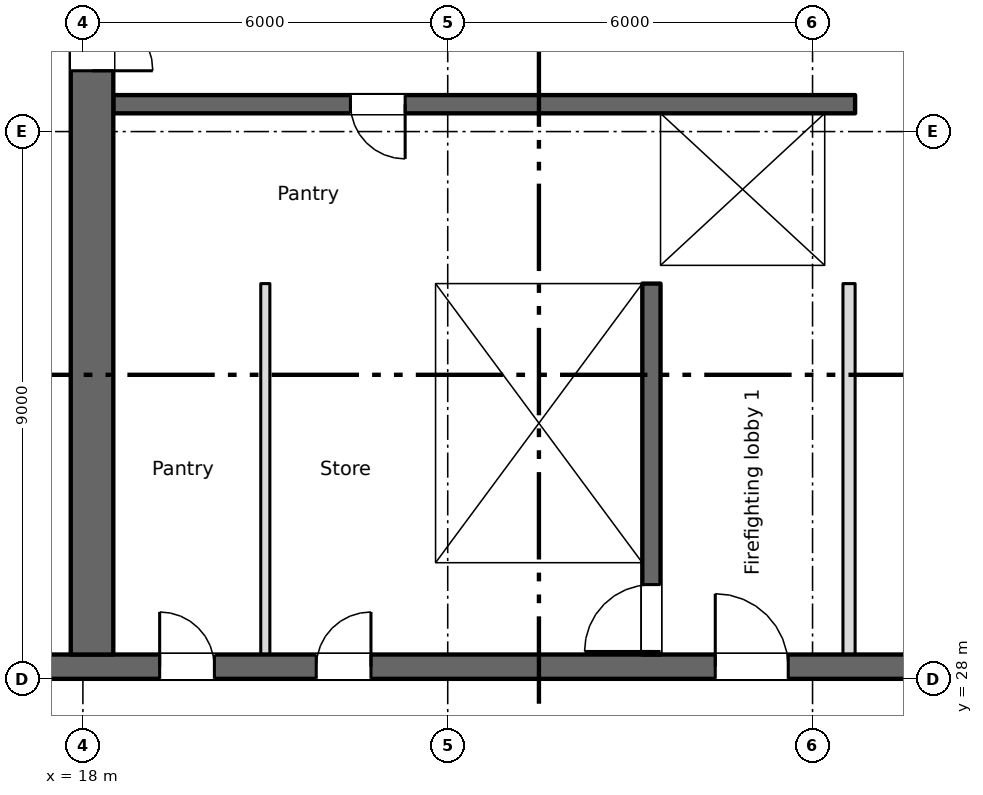
"""IFC4 building model, lengths in metres.
Left out: names, types, materials, properties, quantities, classifications, styles, units other than length and angle.
Written with IfcOpenShell. Run it as: python <this file> out.ifc"""

import sys

from ifc_helpers import new_model, si_unit, direction, frame, frame_2d, origin, place, context, subcontext, project, spatial, rectangle, extrude, element, fill, save


model = new_model("IFC4")
c1 = context("Model", 3, precision=1e-05, world=origin(), true_north=direction((0.0, 1.0)))
c2 = subcontext(c1, "Body", "Model", "MODEL_VIEW")
j1 = project(units=[si_unit("LENGTHUNIT", "METRE"), si_unit("PLANEANGLEUNIT", "RADIAN")], contexts=[c1])
p1 = place(None, origin())
s1 = spatial("IfcSite", under=j1, at=p1, CompositionType="ELEMENT")
p2 = place(p1, origin())
s2 = spatial("IfcBuilding", under=s1, at=p2, CompositionType="ELEMENT")
p3 = place(p2, frame((0.0, 0.0, 208.0)))
s3 = spatial("IfcBuildingStorey", under=s2, at=p3, CompositionType="ELEMENT", Elevation=208.0)
p4 = place(p3, frame((6.6, 28.2, 0.0), z_axis=(0.0, 0.0, 1.0), x_axis=(1.0, 0.0, 0.0)))
e1 = element("IfcWall", 1, at=p4, inside=s3, PredefinedType="SHEAR", context=c2, shape_type="SweptSolid", body=[
    extrude(rectangle(XDim=57.9, YDim=0.4, at=frame_2d((28.95, 0.0))), origin(), (0.0, 0.0, 1.0), 3.35),
])
p5 = place(p4, frame((12.663, 0.0, 0.0)))
e2 = element("IfcOpeningElement", 2, at=p5, cuts=e1, PredefinedType="OPENING", context=c2, shape_type="SweptSolid", body=[
    extrude(rectangle(XDim=0.9, YDim=2.1, at=frame_2d((0.45, 1.05))), frame((0.0, 0.21, 0.0), z_axis=(0.0, -1.0, 0.0), x_axis=(1.0, 0.0, 0.0)), (0.0, 0.0, 1.0), 0.42),
])
p6 = place(p4, frame((15.238, 0.0, 0.0)))
e3 = element("IfcOpeningElement", 3, at=p6, cuts=e1, PredefinedType="OPENING", context=c2, shape_type="SweptSolid", body=[
    extrude(rectangle(XDim=0.9, YDim=2.1, at=frame_2d((0.45, 1.05))), frame((0.0, 0.21, 0.0), z_axis=(0.0, -1.0, 0.0), x_axis=(1.0, 0.0, 0.0)), (0.0, 0.0, 1.0), 0.42),
])
p7 = place(p4, frame((49.95, 0.0, 0.0)))
e4 = element("IfcOpeningElement", 4, at=p7, cuts=e1, PredefinedType="OPENING", context=c2, shape_type="SweptSolid", body=[
    extrude(rectangle(XDim=0.9, YDim=2.1, at=frame_2d((0.45, 1.05))), frame((0.0, 0.21, 0.0), z_axis=(0.0, -1.0, 0.0), x_axis=(1.0, 0.0, 0.0)), (0.0, 0.0, 1.0), 0.42),
])
p8 = place(p4, frame((0.663, 0.0, 0.0)))
e5 = element("IfcOpeningElement", 5, at=p8, cuts=e1, PredefinedType="OPENING", context=c2, shape_type="SweptSolid", body=[
    extrude(rectangle(XDim=0.9, YDim=2.1, at=frame_2d((0.45, 1.05))), frame((0.0, 0.21, 0.0), z_axis=(0.0, -1.0, 0.0), x_axis=(1.0, 0.0, 0.0)), (0.0, 0.0, 1.0), 0.42),
])
p9 = place(p4, frame((2.238, 0.0, 0.0)))
e6 = element("IfcOpeningElement", 6, at=p9, cuts=e1, PredefinedType="OPENING", context=c2, shape_type="SweptSolid", body=[
    extrude(rectangle(XDim=0.9, YDim=2.1, at=frame_2d((0.45, 1.05))), frame((0.0, 0.21, 0.0), z_axis=(0.0, -1.0, 0.0), x_axis=(1.0, 0.0, 0.0)), (0.0, 0.0, 1.0), 0.42),
])
p10 = place(p4, frame((4.8, 0.0, 0.0)))
e7 = element("IfcOpeningElement", 7, at=p10, cuts=e1, PredefinedType="OPENING", context=c2, shape_type="SweptSolid", body=[
    extrude(rectangle(XDim=1.2, YDim=2.1, at=frame_2d((0.6, 1.05))), frame((0.0, 0.21, 0.0), z_axis=(0.0, -1.0, 0.0), x_axis=(1.0, 0.0, 0.0)), (0.0, 0.0, 1.0), 0.42),
])
p11 = place(p4, frame((31.8, 0.0, 0.0)))
e8 = element("IfcOpeningElement", 8, at=p11, cuts=e1, PredefinedType="OPENING", context=c2, shape_type="SweptSolid", body=[
    extrude(rectangle(XDim=1.2, YDim=2.1, at=frame_2d((0.6, 1.05))), frame((0.0, 0.21, 0.0), z_axis=(0.0, -1.0, 0.0), x_axis=(1.0, 0.0, 0.0)), (0.0, 0.0, 1.0), 0.42),
])
p12 = place(p4, frame((55.3, 0.0, 0.0)))
e9 = element("IfcOpeningElement", 9, at=p12, cuts=e1, PredefinedType="OPENING", context=c2, shape_type="SweptSolid", body=[
    extrude(rectangle(XDim=1.2, YDim=2.1, at=frame_2d((0.6, 1.05))), frame((0.0, 0.21, 0.0), z_axis=(0.0, -1.0, 0.0), x_axis=(1.0, 0.0, 0.0)), (0.0, 0.0, 1.0), 0.42),
])
p13 = place(p4, frame((21.8, 0.0, 0.0)))
e10 = element("IfcOpeningElement", 10, at=p13, cuts=e1, PredefinedType="OPENING", context=c2, shape_type="SweptSolid", body=[
    extrude(rectangle(XDim=1.2, YDim=2.1, at=frame_2d((0.6, 1.05))), frame((0.0, 0.21, 0.0), z_axis=(0.0, -1.0, 0.0), x_axis=(1.0, 0.0, 0.0)), (0.0, 0.0, 1.0), 0.42),
])
p14 = place(p4, frame((41.8, 0.0, 0.0)))
e11 = element("IfcOpeningElement", 11, at=p14, cuts=e1, PredefinedType="OPENING", context=c2, shape_type="SweptSolid", body=[
    extrude(rectangle(XDim=1.2, YDim=2.1, at=frame_2d((0.6, 1.05))), frame((0.0, 0.21, 0.0), z_axis=(0.0, -1.0, 0.0), x_axis=(1.0, 0.0, 0.0)), (0.0, 0.0, 1.0), 0.42),
])
p15 = place(p4, frame((24.95, 0.0, 0.0)))
e12 = element("IfcOpeningElement", 12, at=p15, cuts=e1, PredefinedType="OPENING", context=c2, shape_type="SweptSolid", body=[
    extrude(rectangle(XDim=2.4, YDim=2.1, at=frame_2d((1.2, 1.05))), frame((0.0, 0.21, 0.0), z_axis=(0.0, -1.0, 0.0), x_axis=(1.0, 0.0, 0.0)), (0.0, 0.0, 1.0), 0.42),
])
p16 = place(p4, frame((37.45, 0.0, 0.0)))
e13 = element("IfcOpeningElement", 13, at=p16, cuts=e1, PredefinedType="OPENING", context=c2, shape_type="SweptSolid", body=[
    extrude(rectangle(XDim=2.4, YDim=2.1, at=frame_2d((1.2, 1.05))), frame((0.0, 0.21, 0.0), z_axis=(0.0, -1.0, 0.0), x_axis=(1.0, 0.0, 0.0)), (0.0, 0.0, 1.0), 0.42),
])
p17 = place(p4, frame((8.1, 0.0, 0.0)))
e14 = element("IfcOpeningElement", 14, at=p17, cuts=e1, PredefinedType="OPENING", context=c2, shape_type="SweptSolid", body=[
    extrude(rectangle(XDim=2.4, YDim=2.1, at=frame_2d((1.2, 1.05))), frame((0.0, 0.21, 0.0), z_axis=(0.0, -1.0, 0.0), x_axis=(1.0, 0.0, 0.0)), (0.0, 0.0, 1.0), 0.42),
])
p18 = place(p4, frame((28.95, 0.0, 0.0)))
e15 = element("IfcOpeningElement", 15, at=p18, cuts=e1, PredefinedType="OPENING", context=c2, shape_type="SweptSolid", body=[
    extrude(rectangle(XDim=0.9, YDim=2.1, at=frame_2d((0.45, 1.05))), frame((0.0, 0.21, 0.0), z_axis=(0.0, -1.0, 0.0), x_axis=(1.0, 0.0, 0.0)), (0.0, 0.0, 1.0), 0.42),
])
p19 = place(p4, frame((34.95, 0.0, 0.0)))
e16 = element("IfcOpeningElement", 16, at=p19, cuts=e1, PredefinedType="OPENING", context=c2, shape_type="SweptSolid", body=[
    extrude(rectangle(XDim=0.9, YDim=2.1, at=frame_2d((0.45, 1.05))), frame((0.0, 0.21, 0.0), z_axis=(0.0, -1.0, 0.0), x_axis=(1.0, 0.0, 0.0)), (0.0, 0.0, 1.0), 0.42),
])
p20 = place(p3, frame((18.15, 28.4, 0.0), z_axis=(0.0, 0.0, 1.0), x_axis=(0.0, 1.0, 0.0)))
e17 = element("IfcWall", 17, at=p20, inside=s3, PredefinedType="SHEAR", context=c2, shape_type="SweptSolid", body=[
    extrude(rectangle(XDim=16.9, YDim=0.7, at=frame_2d((8.45, 0.0))), origin(), (0.0, 0.0, 1.0), 3.35),
])
p21 = place(p20, frame((9.6, 0.0, 0.0)))
e18 = element("IfcOpeningElement", 18, at=p21, cuts=e17, PredefinedType="OPENING", context=c2, shape_type="SweptSolid", body=[
    extrude(rectangle(XDim=2.0, YDim=2.1, at=frame_2d((1.0, 1.05))), frame((0.0, 0.36, 0.0), z_axis=(0.0, -1.0, 0.0), x_axis=(1.0, 0.0, 0.0)), (0.0, 0.0, 1.0), 0.72),
])
p22 = place(p20, frame((15.4, 0.0, 0.0)))
e19 = element("IfcOpeningElement", 19, at=p22, cuts=e17, PredefinedType="OPENING", context=c2, shape_type="SweptSolid", body=[
    extrude(rectangle(XDim=1.2, YDim=2.1, at=frame_2d((0.6, 1.05))), frame((0.0, 0.36, 0.0), z_axis=(0.0, -1.0, 0.0), x_axis=(1.0, 0.0, 0.0)), (0.0, 0.0, 1.0), 0.72),
])
p23 = place(p3, frame((23.65, 28.4, 0.0), z_axis=(0.0, 0.0, 1.0), x_axis=(0.0, 1.0, 0.0)))
e20 = element("IfcWall", 20, at=p23, inside=s3, PredefinedType="SHEAR", context=c2, shape_type="SweptSolid", body=[
    extrude(rectangle(XDim=6.1, YDim=0.3, at=frame_2d((3.05, 0.0))), origin(), (0.0, 0.0, 1.0), 3.35),
])
p24 = place(p3, frame((27.35, 28.4, 0.0), z_axis=(0.0, 0.0, 1.0), x_axis=(0.0, 1.0, 0.0)))
e21 = element("IfcWall", 21, at=p24, inside=s3, PredefinedType="SHEAR", context=c2, shape_type="SweptSolid", body=[
    extrude(rectangle(XDim=6.1, YDim=0.3, at=frame_2d((3.05, 0.0))), origin(), (0.0, 0.0, 1.0), 3.35),
])
p25 = place(p24, frame((0.05, 0.0, 0.0)))
e22 = element("IfcOpeningElement", 22, at=p25, cuts=e21, PredefinedType="OPENING", context=c2, shape_type="SweptSolid", body=[
    extrude(rectangle(XDim=1.1, YDim=2.1, at=frame_2d((0.55, 1.05))), frame((0.0, 0.16, 0.0), z_axis=(0.0, -1.0, 0.0), x_axis=(1.0, 0.0, 0.0)), (0.0, 0.0, 1.0), 0.32),
])
p26 = place(p3, frame((18.5, 34.65, 0.0), z_axis=(0.0, 0.0, 1.0), x_axis=(1.0, 0.0, 0.0)))
e23 = element("IfcWall", 23, at=p26, inside=s3, PredefinedType="SHEAR", context=c2, shape_type="SweptSolid", body=[
    extrude(rectangle(XDim=12.2, YDim=0.3, at=frame_2d((6.1, 0.0))), origin(), (0.0, 0.0, 1.0), 3.35),
])
p27 = place(p26, frame((9.8, 0.0, 0.0)))
e24 = element("IfcOpeningElement", 24, at=p27, cuts=e23, PredefinedType="OPENING", context=c2, shape_type="SweptSolid", body=[
    extrude(rectangle(XDim=1.1, YDim=2.1, at=frame_2d((0.55, 1.05))), frame((0.0, 0.16, 0.0), z_axis=(0.0, -1.0, 0.0), x_axis=(1.0, 0.0, 0.0)), (0.0, 0.0, 1.0), 0.32),
])
p28 = place(p3, frame((30.7, 37.45, 0.0), z_axis=(0.0, 0.0, 1.0), x_axis=(-1.0, 0.0, 0.0)))
e25 = element("IfcWall", 25, at=p28, inside=s3, PredefinedType="SHEAR", context=c2, shape_type="SweptSolid", body=[
    extrude(rectangle(XDim=12.2, YDim=0.3, at=frame_2d((6.1, 0.0))), origin(), (0.0, 0.0, 1.0), 3.35),
])
p29 = place(p28, frame((7.4, 0.0, 0.0)))
e26 = element("IfcOpeningElement", 26, at=p29, cuts=e25, PredefinedType="OPENING", context=c2, shape_type="SweptSolid", body=[
    extrude(rectangle(XDim=0.9, YDim=2.1, at=frame_2d((0.45, 1.05))), frame((0.0, 0.16, 0.0), z_axis=(0.0, -1.0, 0.0), x_axis=(1.0, 0.0, 0.0)), (0.0, 0.0, 1.0), 0.32),
])
p30 = place(p3, frame((27.35, 34.8, 0.0), z_axis=(0.0, 0.0, 1.0), x_axis=(0.0, 1.0, 0.0)))
e27 = element("IfcWall", 27, at=p30, inside=s3, PredefinedType="SHEAR", context=c2, shape_type="SweptSolid", body=[
    extrude(rectangle(XDim=2.5, YDim=0.3, at=frame_2d((1.25, 0.0))), origin(), (0.0, 0.0, 1.0), 3.35),
])
p31 = place(p3, frame((30.45, 34.8, 0.0), z_axis=(0.0, 0.0, 1.0), x_axis=(0.0, 1.0, 0.0)))
e28 = element("IfcWall", 28, at=p31, inside=s3, PredefinedType="SHEAR", context=c2, shape_type="SweptSolid", body=[
    extrude(rectangle(XDim=2.5, YDim=0.5, at=frame_2d((1.25, 0.0))), origin(), (0.0, 0.0, 1.0), 3.35),
])
p32 = place(p3, frame((30.6, 28.4, 0.0), z_axis=(0.0, 0.0, 1.0), x_axis=(0.0, 1.0, 0.0)))
e29 = element("IfcWall", 29, at=p32, inside=s3, PredefinedType="PARTITIONING", context=c2, shape_type="SweptSolid", body=[
    extrude(rectangle(XDim=6.1, YDim=0.2, at=frame_2d((3.05, 0.0))), origin(), (0.0, 0.0, 1.0), 3.35),
])
p33 = place(p3, frame((21.0, 28.4, 0.0), z_axis=(0.0, 0.0, 1.0), x_axis=(0.0, 1.0, 0.0)))
e30 = element("IfcWall", 30, at=p33, inside=s3, PredefinedType="PARTITIONING", context=c2, shape_type="SweptSolid", body=[
    extrude(rectangle(XDim=6.1, YDim=0.15, at=frame_2d((3.05, 0.0))), origin(), (0.0, 0.0, 1.0), 3.35),
])
p34 = place(p5, origin())
e31 = element("IfcDoor", 31, at=p34, inside=s3, OperationType="SINGLE_SWING_LEFT", PredefinedType="DOOR", context=c2, shape_type="SweptSolid", body=[
    extrude(rectangle(XDim=0.9, YDim=2.1, at=frame_2d((0.45, 1.05))), frame((0.0, 0.025, 0.0), z_axis=(0.0, -1.0, 0.0), x_axis=(1.0, 0.0, 0.0)), (0.0, 0.0, 1.0), 0.05),
])
fill(e2, e31)
p35 = place(p6, origin())
e32 = element("IfcDoor", 32, at=p35, inside=s3, OperationType="SINGLE_SWING_RIGHT", PredefinedType="DOOR", context=c2, shape_type="SweptSolid", body=[
    extrude(rectangle(XDim=0.9, YDim=2.1, at=frame_2d((0.45, 1.05))), frame((0.0, 0.025, 0.0), z_axis=(0.0, -1.0, 0.0), x_axis=(1.0, 0.0, 0.0)), (0.0, 0.0, 1.0), 0.05),
])
fill(e3, e32)
p36 = place(p29, origin())
e33 = element("IfcDoor", 33, at=p36, inside=s3, OperationType="SINGLE_SWING_LEFT", PredefinedType="DOOR", context=c2, shape_type="SweptSolid", body=[
    extrude(rectangle(XDim=0.9, YDim=2.1, at=frame_2d((0.45, 1.05))), frame((0.0, 0.025, 0.0), z_axis=(0.0, -1.0, 0.0), x_axis=(1.0, 0.0, 0.0)), (0.0, 0.0, 1.0), 0.05),
])
fill(e26, e33)
p37 = place(p27, origin())
e34 = element("IfcDoor", 34, at=p37, inside=s3, OperationType="SLIDING_TO_LEFT", PredefinedType="DOOR", context=c2, shape_type="SweptSolid", body=[
    extrude(rectangle(XDim=1.1, YDim=2.1, at=frame_2d((0.55, 1.05))), frame((0.0, 0.025, 0.0), z_axis=(0.0, -1.0, 0.0), x_axis=(1.0, 0.0, 0.0)), (0.0, 0.0, 1.0), 0.05),
])
fill(e24, e34)
p38 = place(p25, origin())
e35 = element("IfcDoor", 35, at=p38, inside=s3, OperationType="SINGLE_SWING_LEFT", PredefinedType="DOOR", context=c2, shape_type="SweptSolid", body=[
    extrude(rectangle(XDim=1.1, YDim=2.1, at=frame_2d((0.55, 1.05))), frame((0.0, 0.025, 0.0), z_axis=(0.0, -1.0, 0.0), x_axis=(1.0, 0.0, 0.0)), (0.0, 0.0, 1.0), 0.05),
])
fill(e22, e35)
p39 = place(p13, origin())
e36 = element("IfcDoor", 36, at=p39, inside=s3, OperationType="SINGLE_SWING_LEFT", PredefinedType="DOOR", context=c2, shape_type="SweptSolid", body=[
    extrude(rectangle(XDim=1.2, YDim=2.1, at=frame_2d((0.6, 1.05))), frame((0.0, 0.025, 0.0), z_axis=(0.0, -1.0, 0.0), x_axis=(1.0, 0.0, 0.0)), (0.0, 0.0, 1.0), 0.05),
])
fill(e10, e36)
p40 = place(p21, origin())
e37 = element("IfcDoor", 37, at=p40, inside=s3, OperationType="DOUBLE_DOOR_SINGLE_SWING", PredefinedType="DOOR", context=c2, shape_type="SweptSolid", body=[
    extrude(rectangle(XDim=2.0, YDim=2.1, at=frame_2d((1.0, 1.05))), frame((0.0, 0.025, 0.0), z_axis=(0.0, -1.0, 0.0), x_axis=(1.0, 0.0, 0.0)), (0.0, 0.0, 1.0), 0.05),
])
fill(e18, e37)
save(model, sys.argv[1])
